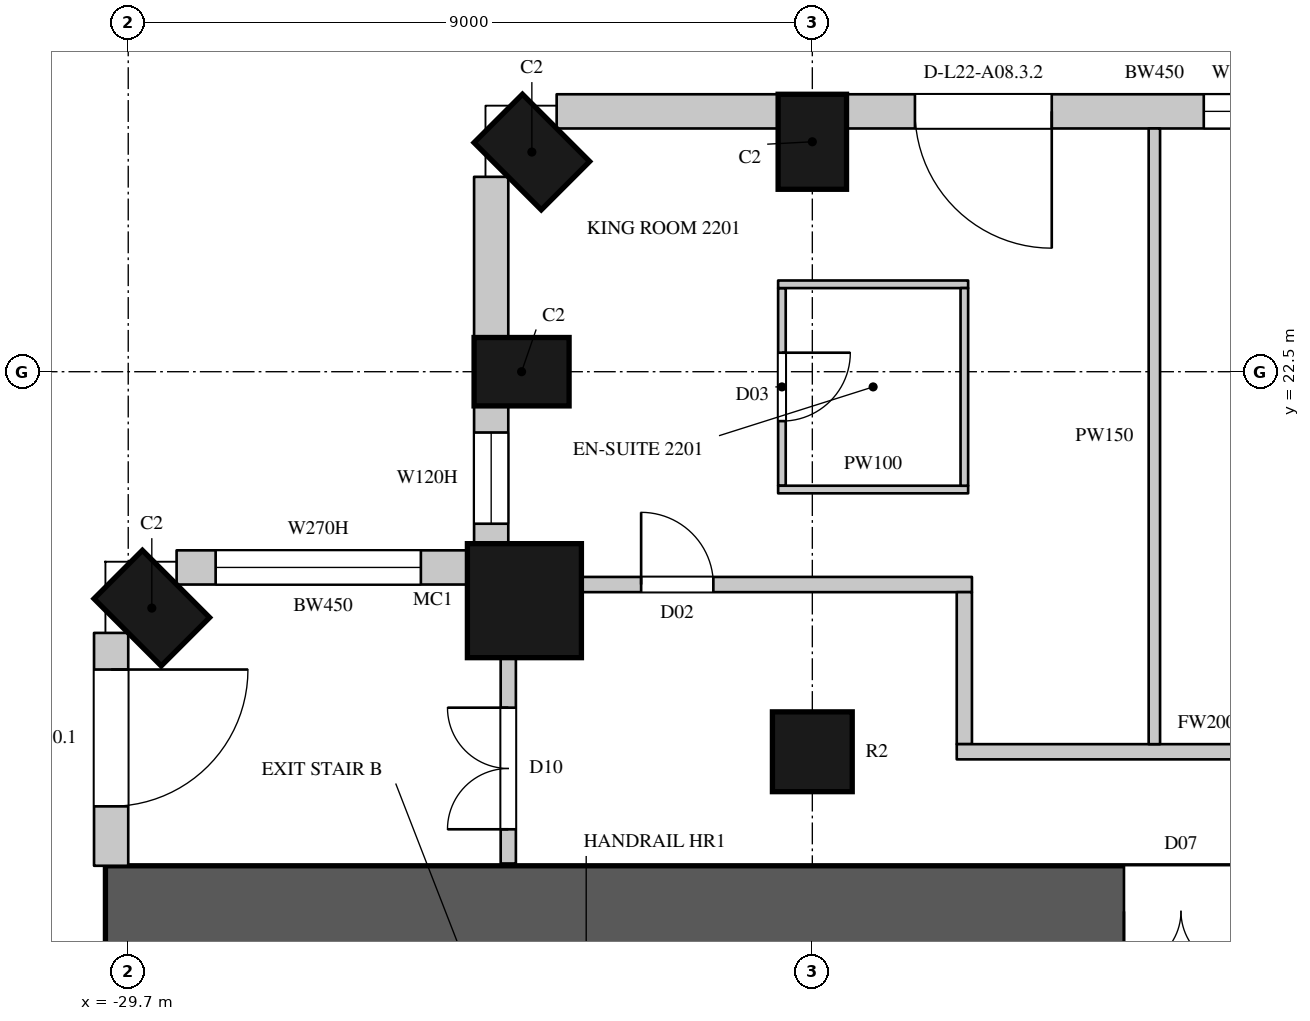
"""IFC4 building model, lengths in metres.
Left out: names, types, materials, properties, quantities, classifications, styles, units other than length and angle.
Written with IfcOpenShell. Run it as: python <this file> out.ifc"""

import sys

from ifc_helpers import new_model, si_unit, direction, frame, frame_2d, origin, origin_2d, place, context, subcontext, project, spatial, rectangle, circle, extrude, element, fill, save


model = new_model("IFC4")
c1 = context("Model", 3, precision=1e-05, world=origin(), true_north=direction((0.0, 1.0)))
c2 = subcontext(c1, "Body", "Model", "MODEL_VIEW")
j1 = project(units=[si_unit("LENGTHUNIT", "METRE"), si_unit("PLANEANGLEUNIT", "RADIAN")], contexts=[c1])
p1 = place(None, origin())
s1 = spatial("IfcSite", under=j1, at=p1, CompositionType="ELEMENT")
p2 = place(p1, origin())
s2 = spatial("IfcBuilding", under=s1, at=p2, CompositionType="ELEMENT")
p3 = place(p2, frame((0.0, 0.0, 109.5)))
s3 = spatial("IfcBuildingStorey", under=s2, at=p3, CompositionType="ELEMENT", Elevation=109.5)
for number, where, z_axis, x_axis in (
    (1, (-29.39, 19.39, 0.0), (0.0, 0.0, 1.0), (-0.707, -0.707, 0.0)),
    (2, (-20.7, 25.525, 0.0), (0.0, 0.0, 1.0), (-1.0, 0.0, 0.0)),
    (3, (-24.39, 25.39, 0.0), (0.0, 0.0, 1.0), (-0.707, -0.707, 0.0)),
    (4, (-24.525, 22.5, 0.0), (0.0, 0.0, 1.0), (0.0, -1.0, 0.0)),
):
    element("IfcColumn", number, at=place(p3, frame(where, z_axis=z_axis, x_axis=x_axis)), inside=s3, PredefinedType="COLUMN", context=c2, shape_type="SweptSolid", body=[
        extrude(rectangle(XDim=0.9, YDim=1.25, at=origin_2d()), origin(), (0.0, 0.0, 1.0), 3.6),
    ])
p4 = place(p3, frame((-24.488, 19.488, 0.0), z_axis=(0.0, 0.0, 1.0), x_axis=(1.0, 0.0, 0.0)))
e5 = element("IfcColumn", 5, at=p4, inside=s3, PredefinedType="COLUMN", context=c2, shape_type="SweptSolid", body=[
    extrude(circle(Radius=0.75, at=origin_2d()), origin(), (0.0, 0.0, 1.0), 3.6),
])
p5 = place(p3, frame((-20.7, 17.5, 0.0), z_axis=(0.0, 0.0, 1.0), x_axis=(1.0, 0.0, 0.0)))
e6 = element("IfcColumn", 6, at=p5, inside=s3, PredefinedType="COLUMN", context=c2, shape_type="SweptSolid", body=[
    extrude(circle(Radius=0.525, at=origin_2d()), origin(), (0.0, 0.0, 1.0), 3.6),
])
p6 = place(p3, frame((-29.925, 19.064, 0.0), z_axis=(0.0, 0.0, 1.0), x_axis=(0.0, -1.0, 0.0)))
e7 = element("IfcWall", 7, at=p6, inside=s3, PredefinedType="SOLIDWALL", context=c2, shape_type="SweptSolid", body=[
    extrude(rectangle(XDim=3.064, YDim=0.45, at=frame_2d((1.532, 0.0))), origin(), (0.0, 0.0, 1.0), 3.3),
])
p7 = place(p6, frame((0.482, 0.0, 0.0)))
e8 = element("IfcOpeningElement", 8, at=p7, cuts=e7, PredefinedType="OPENING", context=c2, shape_type="SweptSolid", body=[
    extrude(rectangle(XDim=1.8, YDim=2.4, at=frame_2d((0.9, 1.2))), frame((0.0, 0.235, 0.0), z_axis=(0.0, -1.0, 0.0), x_axis=(1.0, 0.0, 0.0)), (0.0, 0.0, 1.0), 0.47),
])
p8 = place(p3, frame((-12.15, 25.925, 0.0), z_axis=(0.0, 0.0, 1.0), x_axis=(-1.0, 0.0, 0.0)))
e9 = element("IfcWall", 9, at=p8, inside=s3, PredefinedType="SOLIDWALL", context=c2, shape_type="SweptSolid", body=[
    extrude(rectangle(XDim=8.1, YDim=0.45, at=frame_2d((4.05, 0.0))), origin(), (0.0, 0.0, 1.0), 3.3),
])
p9 = place(p8, frame((0.2, 0.0, 0.0)))
e10 = element("IfcOpeningElement", 10, at=p9, cuts=e9, PredefinedType="OPENING", context=c2, shape_type="SweptSolid", body=[
    extrude(rectangle(XDim=1.8, YDim=2.4, at=frame_2d((0.9, 1.2))), frame((0.0, 0.235, 0.0), z_axis=(0.0, -1.0, 0.0), x_axis=(1.0, 0.0, 0.0)), (0.0, 0.0, 1.0), 0.47),
])
p10 = place(p8, frame((2.2, 0.0, 1.05)))
e11 = element("IfcOpeningElement", 11, at=p10, cuts=e9, PredefinedType="OPENING", context=c2, shape_type="SweptSolid", body=[
    extrude(rectangle(XDim=1.2, YDim=2.0, at=frame_2d((0.6, 1.0))), frame((0.0, 0.235, 0.0), z_axis=(0.0, -1.0, 0.0), x_axis=(1.0, 0.0, 0.0)), (0.0, 0.0, 1.0), 0.47),
])
p11 = place(p8, frame((5.4, 0.0, 0.0)))
e12 = element("IfcOpeningElement", 12, at=p11, cuts=e9, PredefinedType="OPENING", context=c2, shape_type="SweptSolid", body=[
    extrude(rectangle(XDim=1.8, YDim=2.4, at=frame_2d((0.9, 1.2))), frame((0.0, 0.235, 0.0), z_axis=(0.0, -1.0, 0.0), x_axis=(1.0, 0.0, 0.0)), (0.0, 0.0, 1.0), 0.47),
])
p12 = place(p3, frame((-21.15, 25.925, 0.0), z_axis=(0.0, 0.0, 1.0), x_axis=(-1.0, 0.0, 0.0)))
e13 = element("IfcWall", 13, at=p12, inside=s3, PredefinedType="SOLIDWALL", context=c2, shape_type="SweptSolid", body=[
    extrude(rectangle(XDim=2.914, YDim=0.45, at=frame_2d((1.457, 0.0))), origin(), (0.0, 0.0, 1.0), 3.3),
])
p13 = place(p3, frame((-24.925, 25.064, 0.0), z_axis=(0.0, 0.0, 1.0), x_axis=(0.0, -1.0, 0.0)))
e14 = element("IfcWall", 14, at=p13, inside=s3, PredefinedType="SOLIDWALL", context=c2, shape_type="SweptSolid", body=[
    extrude(rectangle(XDim=2.114, YDim=0.45, at=frame_2d((1.057, 0.0))), origin(), (0.0, 0.0, 1.0), 3.3),
])
p14 = place(p3, frame((-24.925, 22.05, 0.0), z_axis=(0.0, 0.0, 1.0), x_axis=(0.0, -1.0, 0.0)))
e15 = element("IfcWall", 15, at=p14, inside=s3, PredefinedType="SOLIDWALL", context=c2, shape_type="SweptSolid", body=[
    extrude(rectangle(XDim=1.843, YDim=0.45, at=frame_2d((0.921, 0.0))), origin(), (0.0, 0.0, 1.0), 3.3),
])
p15 = place(p14, frame((0.35, 0.0, 1.05)))
e16 = element("IfcOpeningElement", 16, at=p15, cuts=e15, PredefinedType="OPENING", context=c2, shape_type="SweptSolid", body=[
    extrude(rectangle(XDim=1.2, YDim=2.0, at=frame_2d((0.6, 1.0))), frame((0.0, 0.235, 0.0), z_axis=(0.0, -1.0, 0.0), x_axis=(1.0, 0.0, 0.0)), (0.0, 0.0, 1.0), 0.47),
])
p16 = place(p3, frame((-25.207, 19.925, 0.0), z_axis=(0.0, 0.0, 1.0), x_axis=(-1.0, 0.0, 0.0)))
e17 = element("IfcWall", 17, at=p16, inside=s3, PredefinedType="SOLIDWALL", context=c2, shape_type="SweptSolid", body=[
    extrude(rectangle(XDim=3.857, YDim=0.45, at=frame_2d((1.928, 0.0))), origin(), (0.0, 0.0, 1.0), 3.3),
])
p17 = place(p16, frame((0.643, 0.0, 1.05)))
e18 = element("IfcOpeningElement", 18, at=p17, cuts=e17, PredefinedType="OPENING", context=c2, shape_type="SweptSolid", body=[
    extrude(rectangle(XDim=2.7, YDim=2.0, at=frame_2d((1.35, 1.0))), frame((0.0, 0.235, 0.0), z_axis=(0.0, -1.0, 0.0), x_axis=(1.0, 0.0, 0.0)), (0.0, 0.0, 1.0), 0.47),
])
p18 = place(p3, frame((-30.0, 15.4, 0.0), z_axis=(0.0, 0.0, 1.0), x_axis=(1.0, 0.0, 0.0)))
e19 = element("IfcWall", 19, at=p18, inside=s3, PredefinedType="SHEAR", context=c2, shape_type="SweptSolid", body=[
    extrude(rectangle(XDim=16.0, YDim=1.2, at=frame_2d((8.0, 0.0))), origin(), (0.0, 0.0, 1.0), 3.6),
])
p19 = place(p18, frame((13.4, 0.0, 0.0)))
e20 = element("IfcOpeningElement", 20, at=p19, cuts=e19, PredefinedType="OPENING", context=c2, shape_type="SweptSolid", body=[
    extrude(rectangle(XDim=1.5, YDim=2.4, at=frame_2d((0.75, 1.2))), frame((0.0, 0.61, 0.0), z_axis=(0.0, -1.0, 0.0), x_axis=(1.0, 0.0, 0.0)), (0.0, 0.0, 1.0), 1.22),
])
p20 = place(p3, frame((-24.7, 16.03, 0.0), z_axis=(0.0, 0.0, 1.0), x_axis=(0.0, 1.0, 0.0)))
e21 = element("IfcWall", 21, at=p20, inside=s3, PredefinedType="PARTITIONING", context=c2, shape_type="SweptSolid", body=[
    extrude(rectangle(XDim=2.722, YDim=0.2, at=frame_2d((1.361, 0.0))), origin(), (0.0, 0.0, 1.0), 3.3),
])
p21 = place(p20, frame((0.45, 0.0, 0.0)))
e22 = element("IfcOpeningElement", 22, at=p21, cuts=e21, PredefinedType="OPENING", context=c2, shape_type="SweptSolid", body=[
    extrude(rectangle(XDim=1.6, YDim=2.4, at=frame_2d((0.8, 1.2))), frame((0.0, 0.11, 0.0), z_axis=(0.0, -1.0, 0.0), x_axis=(1.0, 0.0, 0.0)), (0.0, 0.0, 1.0), 0.22),
])
p22 = place(p3, frame((-23.752, 19.7, 0.0), z_axis=(0.0, 0.0, 1.0), x_axis=(1.0, 0.0, 0.0)))
e23 = element("IfcWall", 23, at=p22, inside=s3, PredefinedType="PARTITIONING", context=c2, shape_type="SweptSolid", body=[
    extrude(rectangle(XDim=5.152, YDim=0.2, at=frame_2d((2.576, 0.0))), origin(), (0.0, 0.0, 1.0), 3.3),
])
p23 = place(p22, frame((0.8, 0.0, 0.0)))
e24 = element("IfcOpeningElement", 24, at=p23, cuts=e23, PredefinedType="OPENING", context=c2, shape_type="SweptSolid", body=[
    extrude(rectangle(XDim=0.95, YDim=2.2, at=frame_2d((0.475, 1.1))), frame((0.0, 0.11, 0.0), z_axis=(0.0, -1.0, 0.0), x_axis=(1.0, 0.0, 0.0)), (0.0, 0.0, 1.0), 0.22),
])
p24 = place(p3, frame((-18.7, 17.6, 0.0), z_axis=(0.0, 0.0, 1.0), x_axis=(0.0, 1.0, 0.0)))
e25 = element("IfcWall", 25, at=p24, inside=s3, PredefinedType="PARTITIONING", context=c2, shape_type="SweptSolid", body=[
    extrude(rectangle(XDim=2.0, YDim=0.2, at=frame_2d((1.0, 0.0))), origin(), (0.0, 0.0, 1.0), 3.3),
])
p25 = place(p3, frame((-18.8, 17.5, 0.0), z_axis=(0.0, 0.0, 1.0), x_axis=(1.0, 0.0, 0.0)))
e26 = element("IfcWall", 26, at=p25, inside=s3, PredefinedType="PARTITIONING", context=c2, shape_type="SweptSolid", body=[
    extrude(rectangle(XDim=6.575, YDim=0.2, at=frame_2d((3.288, 0.0))), origin(), (0.0, 0.0, 1.0), 2.75),
])
p26 = place(p25, frame((3.85, 0.0, 0.0)))
e27 = element("IfcOpeningElement", 27, at=p26, cuts=e26, PredefinedType="OPENING", context=c2, shape_type="SweptSolid", body=[
    extrude(rectangle(XDim=1.1, YDim=2.4, at=frame_2d((0.55, 1.2))), frame((0.0, 0.11, 0.0), z_axis=(0.0, -1.0, 0.0), x_axis=(1.0, 0.0, 0.0)), (0.0, 0.0, 1.0), 0.22),
])
p27 = place(p3, frame((-16.2, 17.6, 0.0), z_axis=(0.0, 0.0, 1.0), x_axis=(0.0, 1.0, 0.0)))
e28 = element("IfcWall", 28, at=p27, inside=s3, PredefinedType="PARTITIONING", context=c2, shape_type="SweptSolid", body=[
    extrude(rectangle(XDim=8.1, YDim=0.15, at=frame_2d((4.05, 0.0))), origin(), (0.0, 0.0, 1.0), 2.65),
])
p28 = place(p3, frame((-21.1, 21.0, 0.0), z_axis=(0.0, 0.0, 1.0), x_axis=(0.0, 1.0, 0.0)))
e29 = element("IfcWall", 29, at=p28, inside=s3, PredefinedType="PARTITIONING", context=c2, shape_type="SweptSolid", body=[
    extrude(rectangle(XDim=2.6, YDim=0.1, at=frame_2d((1.3, 0.0))), origin(), (0.0, 0.0, 1.0), 3.3),
])
p29 = place(p28, frame((0.85, 0.0, 0.0)))
e30 = element("IfcOpeningElement", 30, at=p29, cuts=e29, PredefinedType="OPENING", context=c2, shape_type="SweptSolid", body=[
    extrude(rectangle(XDim=0.9, YDim=2.2, at=frame_2d((0.45, 1.1))), frame((0.0, 0.06, 0.0), z_axis=(0.0, -1.0, 0.0), x_axis=(1.0, 0.0, 0.0)), (0.0, 0.0, 1.0), 0.12),
])
for number, where, z_axis, x_axis in (
    (31, (-21.15, 20.95, 0.0), (0.0, 0.0, 1.0), (1.0, 0.0, 0.0)),
    (32, (-21.15, 23.65, 0.0), (0.0, 0.0, 1.0), (1.0, 0.0, 0.0)),
):
    element("IfcWall", number, at=place(p3, frame(where, z_axis=z_axis, x_axis=x_axis)), inside=s3, PredefinedType="PARTITIONING", context=c2, shape_type="SweptSolid", body=[
        extrude(rectangle(XDim=2.5, YDim=0.1, at=frame_2d((1.25, 0.0))), origin(), (0.0, 0.0, 1.0), 3.3),
    ])
p30 = place(p3, frame((-18.7, 21.0, 0.0), z_axis=(0.0, 0.0, 1.0), x_axis=(0.0, 1.0, 0.0)))
e33 = element("IfcWall", 33, at=p30, inside=s3, PredefinedType="PARTITIONING", context=c2, shape_type="SweptSolid", body=[
    extrude(rectangle(XDim=2.6, YDim=0.1, at=frame_2d((1.3, 0.0))), origin(), (0.0, 0.0, 1.0), 3.3),
])
p31 = place(p7, origin())
e34 = element("IfcDoor", 34, at=p31, inside=s3, OperationType="SLIDING_TO_LEFT", PredefinedType="DOOR", context=c2, shape_type="SweptSolid", body=[
    extrude(rectangle(XDim=1.8, YDim=2.4, at=frame_2d((0.9, 1.2))), frame((0.0, 0.13, 0.0), z_axis=(0.0, -1.0, 0.0), x_axis=(1.0, 0.0, 0.0)), (0.0, 0.0, 1.0), 0.05),
])
fill(e8, e34)
p32 = place(p10, origin())
e35 = element("IfcWindow", 35, at=p32, inside=s3, PartitioningType="SINGLE_PANEL", PredefinedType="WINDOW", context=c2, shape_type="SweptSolid", body=[
    extrude(rectangle(XDim=1.2, YDim=2.0, at=frame_2d((0.6, 1.0))), frame((0.0, 0.135, 0.0), z_axis=(0.0, -1.0, 0.0), x_axis=(1.0, 0.0, 0.0)), (0.0, 0.0, 1.0), 0.06),
])
fill(e11, e35)
p33 = place(p11, origin())
e36 = element("IfcDoor", 36, at=p33, inside=s3, OperationType="SLIDING_TO_LEFT", PredefinedType="DOOR", context=c2, shape_type="SweptSolid", body=[
    extrude(rectangle(XDim=1.8, YDim=2.4, at=frame_2d((0.9, 1.2))), frame((0.0, 0.13, 0.0), z_axis=(0.0, -1.0, 0.0), x_axis=(1.0, 0.0, 0.0)), (0.0, 0.0, 1.0), 0.05),
])
fill(e12, e36)
p34 = place(p15, origin())
e37 = element("IfcWindow", 37, at=p34, inside=s3, PartitioningType="SINGLE_PANEL", PredefinedType="WINDOW", context=c2, shape_type="SweptSolid", body=[
    extrude(rectangle(XDim=1.2, YDim=2.0, at=frame_2d((0.6, 1.0))), frame((0.0, 0.135, 0.0), z_axis=(0.0, -1.0, 0.0), x_axis=(1.0, 0.0, 0.0)), (0.0, 0.0, 1.0), 0.06),
])
fill(e16, e37)
p35 = place(p17, origin())
e38 = element("IfcWindow", 38, at=p35, inside=s3, PartitioningType="SINGLE_PANEL", PredefinedType="WINDOW", context=c2, shape_type="SweptSolid", body=[
    extrude(rectangle(XDim=2.7, YDim=2.0, at=frame_2d((1.35, 1.0))), frame((0.0, 0.135, 0.0), z_axis=(0.0, -1.0, 0.0), x_axis=(1.0, 0.0, 0.0)), (0.0, 0.0, 1.0), 0.06),
])
fill(e18, e38)
p36 = place(p21, origin())
e39 = element("IfcDoor", 39, at=p36, inside=s3, OperationType="DOUBLE_DOOR_SINGLE_SWING", PredefinedType="DOOR", context=c2, shape_type="SweptSolid", body=[
    extrude(rectangle(XDim=1.6, YDim=2.4, at=frame_2d((0.8, 1.2))), frame((0.0, 0.025, 0.0), z_axis=(0.0, -1.0, 0.0), x_axis=(1.0, 0.0, 0.0)), (0.0, 0.0, 1.0), 0.05),
])
fill(e22, e39)
p37 = place(p23, origin())
e40 = element("IfcDoor", 40, at=p37, inside=s3, OperationType="SINGLE_SWING_LEFT", PredefinedType="DOOR", context=c2, shape_type="SweptSolid", body=[
    extrude(rectangle(XDim=0.95, YDim=2.2, at=frame_2d((0.475, 1.1))), frame((0.0, 0.025, 0.0), z_axis=(0.0, -1.0, 0.0), x_axis=(1.0, 0.0, 0.0)), (0.0, 0.0, 1.0), 0.05),
])
fill(e24, e40)
p38 = place(p29, origin())
e41 = element("IfcDoor", 41, at=p38, inside=s3, OperationType="SINGLE_SWING_LEFT", PredefinedType="DOOR", context=c2, shape_type="SweptSolid", body=[
    extrude(rectangle(XDim=0.9, YDim=2.2, at=frame_2d((0.45, 1.1))), frame((0.0, 0.025, 0.0), z_axis=(0.0, -1.0, 0.0), x_axis=(1.0, 0.0, 0.0)), (0.0, 0.0, 1.0), 0.05),
])
fill(e30, e41)
p39 = place(p19, origin())
e42 = element("IfcDoor", 42, at=p39, inside=s3, OperationType="DOUBLE_DOOR_SINGLE_SWING", PredefinedType="DOOR", context=c2, shape_type="SweptSolid", body=[
    extrude(rectangle(XDim=1.5, YDim=2.4, at=frame_2d((0.75, 1.2))), frame((0.0, 0.025, 0.0), z_axis=(0.0, -1.0, 0.0), x_axis=(1.0, 0.0, 0.0)), (0.0, 0.0, 1.0), 0.05),
])
fill(e20, e42)
save(model, sys.argv[1])
